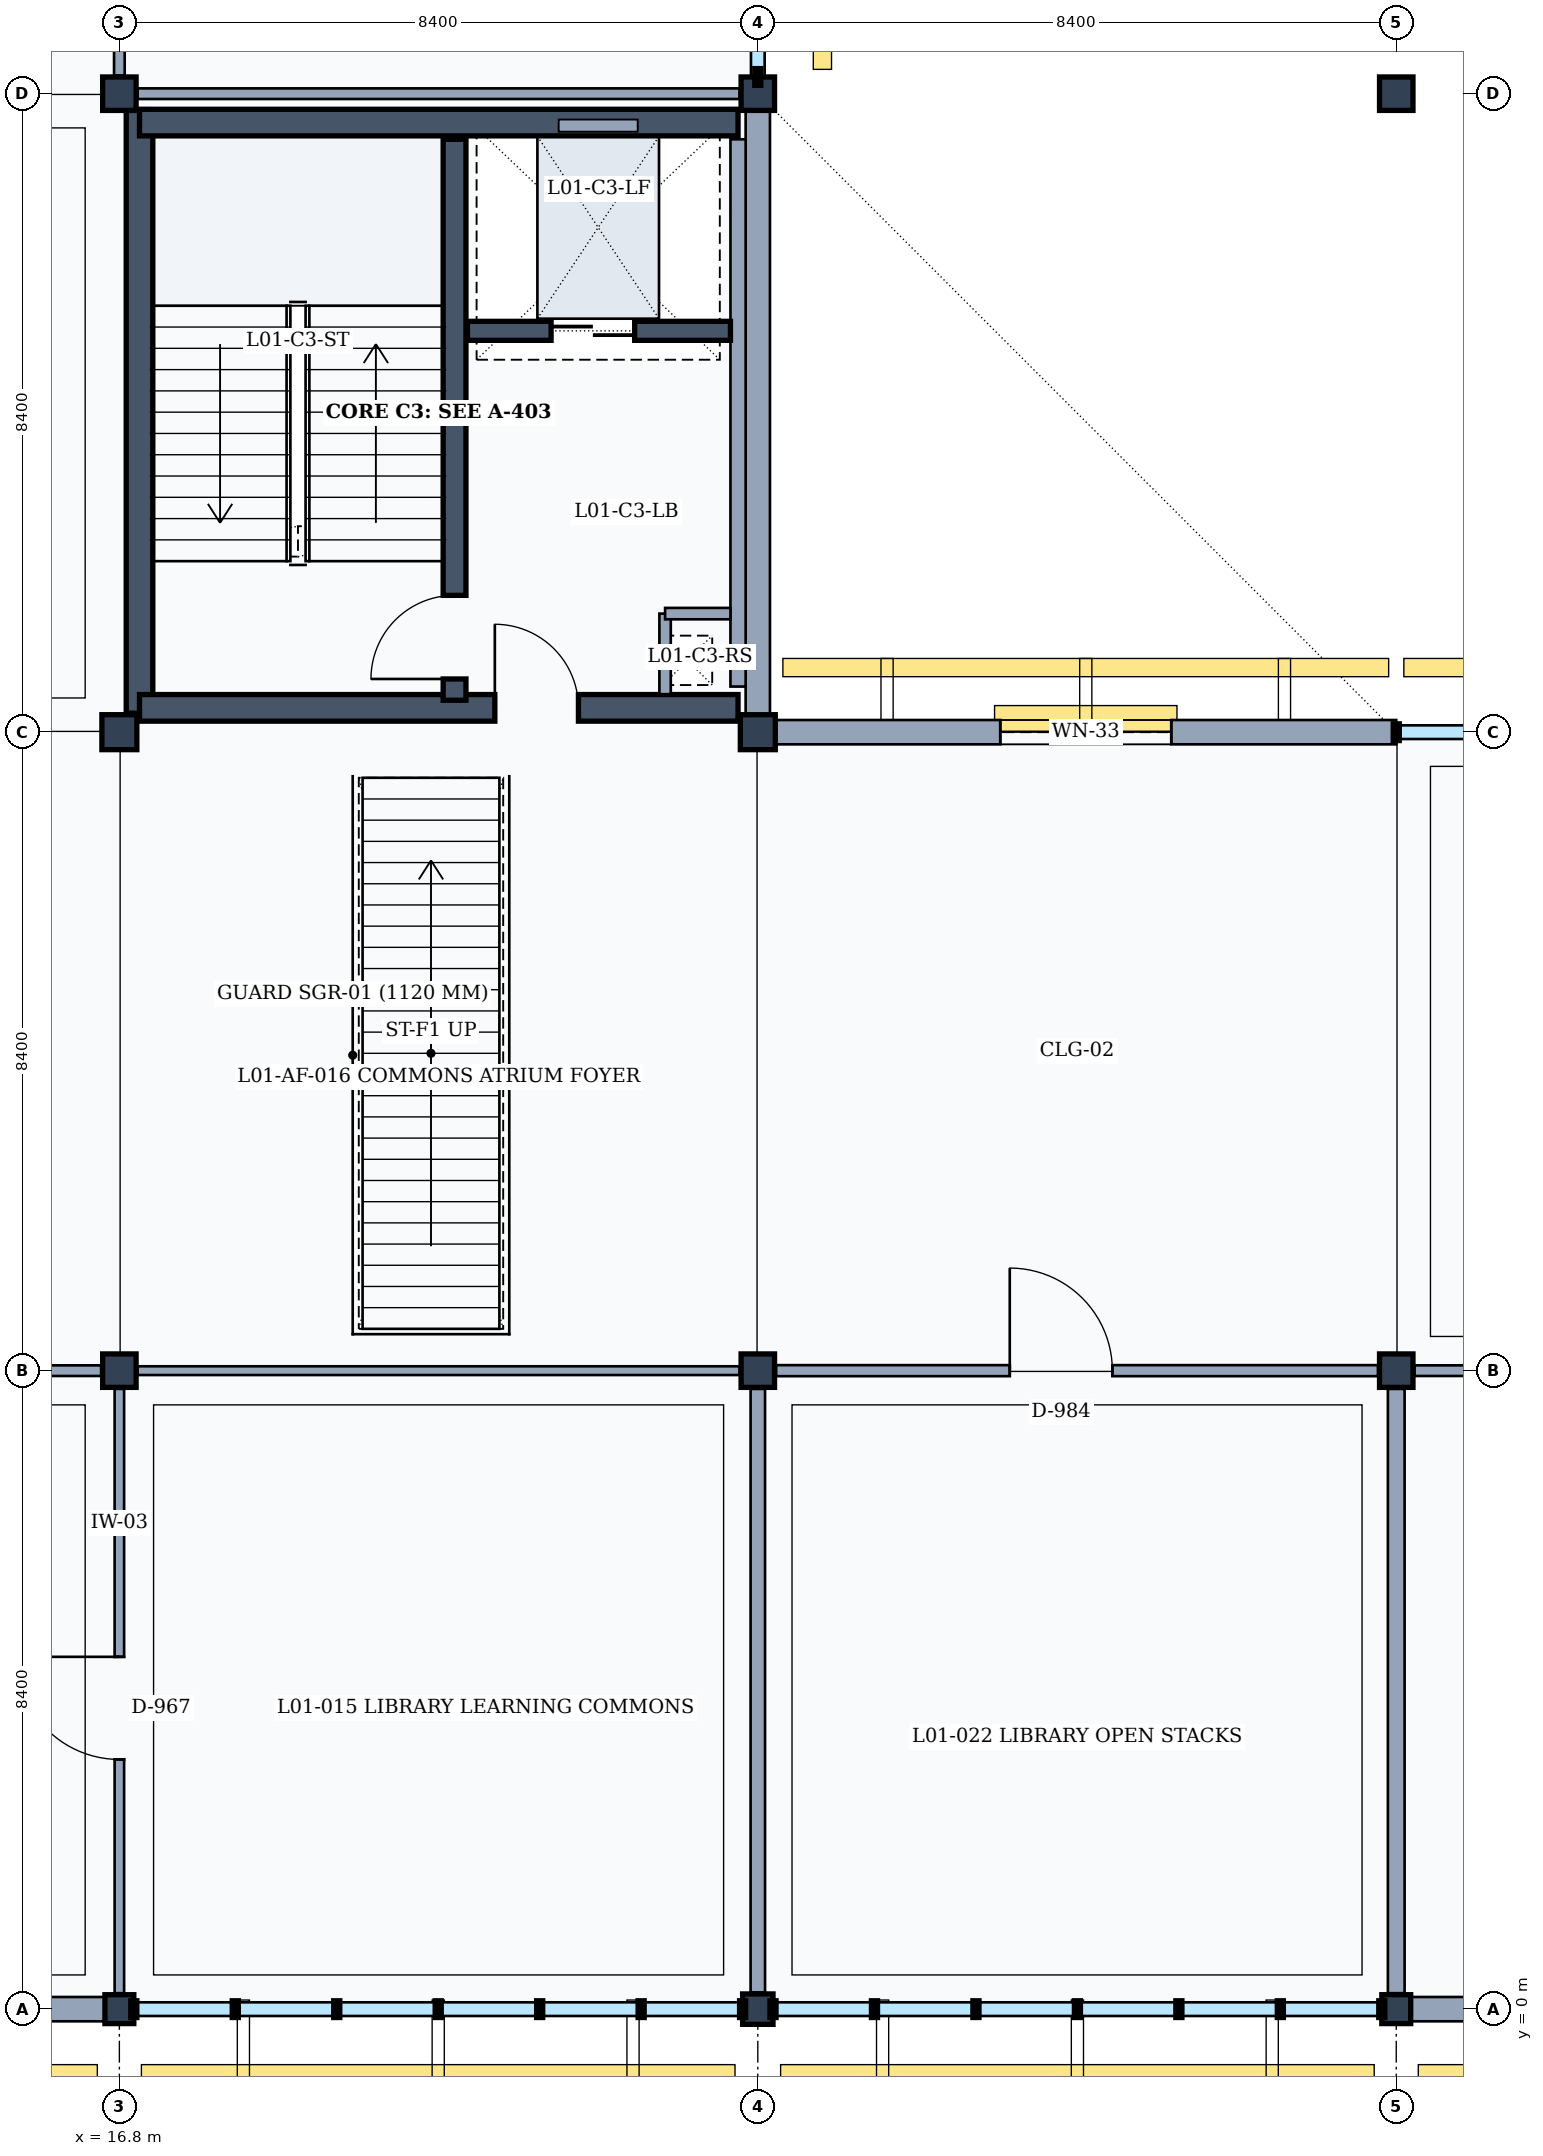
"""IFC4 building model, lengths in metres.
Left out: names, types, materials, properties, quantities, classifications, styles, units other than length and angle.
Written with IfcOpenShell. Run it as: python <this file> out.ifc"""

import sys

from ifc_helpers import new_model, si_unit, direction, frame, frame_2d, origin, origin_2d, place, context, subcontext, project, spatial, rectangle, extrude, element, fill, save


model = new_model("IFC4")
c1 = context("Model", 3, precision=1e-05, world=origin(), true_north=direction((0.0, 1.0)))
c2 = subcontext(c1, "Body", "Model", "MODEL_VIEW")
j1 = project(units=[si_unit("LENGTHUNIT", "METRE"), si_unit("PLANEANGLEUNIT", "RADIAN")], contexts=[c1])
p1 = place(None, origin())
s1 = spatial("IfcSite", under=j1, at=p1, CompositionType="ELEMENT")
p2 = place(p1, origin())
s2 = spatial("IfcBuilding", under=s1, at=p2, CompositionType="ELEMENT")
p3 = place(p2, frame((0.0, 0.0, 4.8)))
s3 = spatial("IfcBuildingStorey", under=s2, at=p3, CompositionType="ELEMENT", Elevation=4.8)
p4 = place(p3, frame((16.8, 0.0, 0.0), z_axis=(0.0, 0.0, 1.0), x_axis=(1.0, 0.0, 0.0)))
e1 = element("IfcColumn", 1, at=p4, inside=s3, PredefinedType="COLUMN", context=c2, shape_type="SweptSolid", body=[
    extrude(rectangle(XDim=0.38, YDim=0.38, at=origin_2d()), origin(), (0.0, 0.0, 1.0), 4.8),
])
p5 = place(p3, frame((16.8, 8.4, 0.0), z_axis=(0.0, 0.0, 1.0), x_axis=(1.0, 0.0, 0.0)))
e2 = element("IfcColumn", 2, at=p5, inside=s3, PredefinedType="COLUMN", context=c2, shape_type="SweptSolid", body=[
    extrude(rectangle(XDim=0.44, YDim=0.44, at=origin_2d()), origin(), (0.0, 0.0, 1.0), 4.8),
])
p6 = place(p3, frame((16.8, 16.8, 0.0), z_axis=(0.0, 0.0, 1.0), x_axis=(1.0, 0.0, 0.0)))
e3 = element("IfcColumn", 3, at=p6, inside=s3, PredefinedType="COLUMN", context=c2, shape_type="SweptSolid", body=[
    extrude(rectangle(XDim=0.46, YDim=0.46, at=origin_2d()), origin(), (0.0, 0.0, 1.0), 4.8),
])
p7 = place(p3, frame((16.8, 25.2, 0.0), z_axis=(0.0, 0.0, 1.0), x_axis=(1.0, 0.0, 0.0)))
e4 = element("IfcColumn", 4, at=p7, inside=s3, PredefinedType="COLUMN", context=c2, shape_type="SweptSolid", body=[
    extrude(rectangle(XDim=0.44, YDim=0.44, at=origin_2d()), origin(), (0.0, 0.0, 1.0), 4.8),
])
p8 = place(p3, frame((25.2, 0.0, 0.0), z_axis=(0.0, 0.0, 1.0), x_axis=(1.0, 0.0, 0.0)))
e5 = element("IfcColumn", 5, at=p8, inside=s3, PredefinedType="COLUMN", context=c2, shape_type="SweptSolid", body=[
    extrude(rectangle(XDim=0.4, YDim=0.4, at=origin_2d()), origin(), (0.0, 0.0, 1.0), 4.8),
])
p9 = place(p3, frame((25.2, 8.4, 0.0), z_axis=(0.0, 0.0, 1.0), x_axis=(1.0, 0.0, 0.0)))
e6 = element("IfcColumn", 6, at=p9, inside=s3, PredefinedType="COLUMN", context=c2, shape_type="SweptSolid", body=[
    extrude(rectangle(XDim=0.44, YDim=0.44, at=origin_2d()), origin(), (0.0, 0.0, 1.0), 4.8),
])
p10 = place(p3, frame((25.2, 16.8, 0.0), z_axis=(0.0, 0.0, 1.0), x_axis=(1.0, 0.0, 0.0)))
e7 = element("IfcColumn", 7, at=p10, inside=s3, PredefinedType="COLUMN", context=c2, shape_type="SweptSolid", body=[
    extrude(rectangle(XDim=0.46, YDim=0.46, at=origin_2d()), origin(), (0.0, 0.0, 1.0), 4.8),
])
p11 = place(p3, frame((25.2, 25.2, 0.0), z_axis=(0.0, 0.0, 1.0), x_axis=(1.0, 0.0, 0.0)))
e8 = element("IfcColumn", 8, at=p11, inside=s3, PredefinedType="COLUMN", context=c2, shape_type="SweptSolid", body=[
    extrude(rectangle(XDim=0.44, YDim=0.44, at=origin_2d()), origin(), (0.0, 0.0, 1.0), 4.8),
])
p12 = place(p3, frame((33.6, 0.0, 0.0), z_axis=(0.0, 0.0, 1.0), x_axis=(1.0, 0.0, 0.0)))
e9 = element("IfcColumn", 9, at=p12, inside=s3, PredefinedType="COLUMN", context=c2, shape_type="SweptSolid", body=[
    extrude(rectangle(XDim=0.38, YDim=0.38, at=origin_2d()), origin(), (0.0, 0.0, 1.0), 4.8),
])
for number, where, z_axis, x_axis in (
    (10, (33.6, 8.4, 0.0), (0.0, 0.0, 1.0), (1.0, 0.0, 0.0)),
    (11, (33.6, 25.2, 0.0), (0.0, 0.0, 1.0), (1.0, 0.0, 0.0)),
):
    element("IfcColumn", number, at=place(p3, frame(where, z_axis=z_axis, x_axis=x_axis)), inside=s3, PredefinedType="COLUMN", context=c2, shape_type="SweptSolid", body=[
        extrude(rectangle(XDim=0.44, YDim=0.44, at=origin_2d()), origin(), (0.0, 0.0, 1.0), 4.8),
    ])
p13 = place(p3, frame((16.61, 0.0, 0.0), z_axis=(0.0, 0.0, 1.0), x_axis=(-1.0, 0.0, 0.0)))
e12 = element("IfcWall", 12, at=p13, inside=s3, PredefinedType="SOLIDWALL", context=c2, shape_type="SweptSolid", body=[
    extrude(rectangle(XDim=8.01, YDim=0.32, at=frame_2d((4.005, 0.0))), origin(), (0.0, 0.0, 1.0), 3.96),
])
p14 = place(p13, frame((3.33, 0.0, 0.9)))
e13 = element("IfcOpeningElement", 13, at=p14, cuts=e12, PredefinedType="OPENING", context=c2, shape_type="SweptSolid", body=[
    extrude(rectangle(XDim=1.35, YDim=1.6, at=frame_2d((0.675, 0.8))), frame((0.0, 0.17, 0.0), z_axis=(0.0, -1.0, 0.0), x_axis=(1.0, 0.0, 0.0)), (0.0, 0.0, 1.0), 0.34),
])
p15 = place(p3, frame((25.2, 24.98, 0.0), z_axis=(0.0, 0.0, 1.0), x_axis=(0.0, -1.0, 0.0)))
e14 = element("IfcWall", 14, at=p15, inside=s3, PredefinedType="SOLIDWALL", context=c2, shape_type="SweptSolid", body=[
    extrude(rectangle(XDim=7.95, YDim=0.32, at=frame_2d((3.975, 0.0))), origin(), (0.0, 0.0, 1.0), 3.96),
])
p16 = place(p3, frame((25.43, 16.8, 0.0), z_axis=(0.0, 0.0, 1.0), x_axis=(1.0, 0.0, 0.0)))
e15 = element("IfcWall", 15, at=p16, inside=s3, PredefinedType="SOLIDWALL", context=c2, shape_type="SweptSolid", body=[
    extrude(rectangle(XDim=8.17, YDim=0.32, at=frame_2d((4.085, 0.0))), origin(), (0.0, 0.0, 1.0), 2.95),
])
p17 = place(p16, frame((2.96, 0.0, 0.9)))
e16 = element("IfcOpeningElement", 16, at=p17, cuts=e15, PredefinedType="OPENING", context=c2, shape_type="SweptSolid", body=[
    extrude(rectangle(XDim=2.25, YDim=1.6, at=frame_2d((1.125, 0.8))), frame((0.0, 0.17, 0.0), z_axis=(0.0, -1.0, 0.0), x_axis=(1.0, 0.0, 0.0)), (0.0, 0.0, 1.0), 0.34),
])
p18 = place(p3, frame((41.8, 0.0, 0.0), z_axis=(0.0, 0.0, 1.0), x_axis=(-1.0, 0.0, 0.0)))
e17 = element("IfcWall", 17, at=p18, inside=s3, PredefinedType="SOLIDWALL", context=c2, shape_type="SweptSolid", body=[
    extrude(rectangle(XDim=8.01, YDim=0.32, at=frame_2d((4.005, 0.0))), origin(), (0.0, 0.0, 1.0), 3.96),
])
p19 = place(p18, frame((2.68, 0.0, 0.9)))
e18 = element("IfcOpeningElement", 18, at=p19, cuts=e17, PredefinedType="OPENING", context=c2, shape_type="SweptSolid", body=[
    extrude(rectangle(XDim=2.65, YDim=1.8, at=frame_2d((1.325, 0.9))), frame((0.0, 0.17, 0.0), z_axis=(0.0, -1.0, 0.0), x_axis=(1.0, 0.0, 0.0)), (0.0, 0.0, 1.0), 0.34),
])
p20 = place(p3, frame((17.065, 17.05, 0.0), z_axis=(0.0, 0.0, 1.0), x_axis=(0.0, 1.0, 0.0)))
e19 = element("IfcWall", 19, at=p20, inside=s3, PredefinedType="SHEAR", context=c2, shape_type="SweptSolid", body=[
    extrude(rectangle(XDim=7.94, YDim=0.35, at=frame_2d((3.97, 0.0))), origin(), (0.0, 0.0, 1.0), 4.56),
])
p21 = place(p3, frame((17.065, 24.82, 0.0), z_axis=(0.0, 0.0, 1.0), x_axis=(1.0, 0.0, 0.0)))
e20 = element("IfcWall", 20, at=p21, inside=s3, PredefinedType="SHEAR", context=c2, shape_type="SweptSolid", body=[
    extrude(rectangle(XDim=7.875, YDim=0.35, at=frame_2d((3.938, 0.0))), origin(), (0.0, 0.0, 1.0), 4.56),
])
p22 = place(p3, frame((24.94, 24.6, 0.0), z_axis=(0.0, 0.0, 1.0), x_axis=(0.0, -1.0, 0.0)))
e21 = element("IfcWall", 21, at=p22, inside=s3, PredefinedType="PARTITIONING", context=c2, shape_type="SweptSolid", body=[
    extrude(rectangle(XDim=7.2, YDim=0.2, at=frame_2d((3.6, 0.0))), origin(), (0.0, 0.0, 1.0), 3.92),
])
p23 = place(p3, frame((24.94, 17.12, 0.0), z_axis=(0.0, 0.0, 1.0), x_axis=(-1.0, 0.0, 0.0)))
e22 = element("IfcWall", 22, at=p23, inside=s3, PredefinedType="SHEAR", context=c2, shape_type="SweptSolid", body=[
    extrude(rectangle(XDim=7.875, YDim=0.35, at=frame_2d((3.938, 0.0))), origin(), (0.0, 0.0, 1.0), 4.56),
])
p24 = place(p23, frame((2.1, 0.0, 0.0)))
e23 = element("IfcOpeningElement", 23, at=p24, cuts=e22, PredefinedType="OPENING", context=c2, shape_type="SweptSolid", body=[
    extrude(rectangle(XDim=1.1, YDim=2.15, at=frame_2d((0.55, 1.075))), frame((0.0, 0.185, 0.0), z_axis=(0.0, -1.0, 0.0), x_axis=(1.0, 0.0, 0.0)), (0.0, 0.0, 1.0), 0.37),
])
p25 = place(p3, frame((21.21, 17.22, 0.0), z_axis=(0.0, 0.0, 1.0), x_axis=(0.0, 1.0, 0.0)))
e24 = element("IfcWall", 24, at=p25, inside=s3, PredefinedType="SHEAR", context=c2, shape_type="SweptSolid", body=[
    extrude(rectangle(XDim=7.38, YDim=0.3, at=frame_2d((3.69, 0.0))), origin(), (0.0, 0.0, 1.0), 4.56),
])
p26 = place(p25, frame((0.28, 0.0, 0.0)))
e25 = element("IfcOpeningElement", 25, at=p26, cuts=e24, PredefinedType="OPENING", context=c2, shape_type="SweptSolid", body=[
    extrude(rectangle(XDim=1.1, YDim=2.15, at=frame_2d((0.55, 1.075))), frame((0.0, 0.16, 0.0), z_axis=(0.0, -1.0, 0.0), x_axis=(1.0, 0.0, 0.0)), (0.0, 0.0, 1.0), 0.32),
])
p27 = place(p3, frame((23.98, 18.36, 0.0), z_axis=(0.0, 0.0, 1.0), x_axis=(0.0, -1.0, 0.0)))
e26 = element("IfcWall", 26, at=p27, inside=s3, PredefinedType="PARTITIONING", context=c2, shape_type="SweptSolid", body=[
    extrude(rectangle(XDim=1.06, YDim=0.15, at=frame_2d((0.53, 0.0))), origin(), (0.0, 0.0, 1.0), 3.92),
])
p28 = place(p3, frame((23.98, 18.36, 0.0), z_axis=(0.0, 0.0, 1.0), x_axis=(1.0, 0.0, 0.0)))
e27 = element("IfcWall", 27, at=p28, inside=s3, PredefinedType="PARTITIONING", context=c2, shape_type="SweptSolid", body=[
    extrude(rectangle(XDim=0.86, YDim=0.15, at=frame_2d((0.43, 0.0))), origin(), (0.0, 0.0, 1.0), 3.92),
])
p29 = place(p3, frame((21.38, 22.08, 0.0), z_axis=(0.0, 0.0, 1.0), x_axis=(1.0, 0.0, 0.0)))
e28 = element("IfcWall", 28, at=p29, inside=s3, PredefinedType="SHEAR", context=c2, shape_type="SweptSolid", body=[
    extrude(rectangle(XDim=3.46, YDim=0.25, at=frame_2d((1.73, 0.0))), origin(), (0.0, 0.0, 1.0), 4.56),
])
p30 = place(p29, frame((1.1, 0.0, 0.0)))
e29 = element("IfcOpeningElement", 29, at=p30, cuts=e28, PredefinedType="OPENING", context=c2, shape_type="SweptSolid", body=[
    extrude(rectangle(XDim=1.1, YDim=2.15, at=frame_2d((0.55, 1.075))), frame((0.0, 0.135, 0.0), z_axis=(0.0, -1.0, 0.0), x_axis=(1.0, 0.0, 0.0)), (0.0, 0.0, 1.0), 0.27),
])
p31 = place(p3, frame((16.8, 0.21, 0.0), z_axis=(0.0, 0.0, 1.0), x_axis=(0.0, 1.0, 0.0)))
e30 = element("IfcWall", 30, at=p31, inside=s3, PredefinedType="PARTITIONING", context=c2, shape_type="SweptSolid", body=[
    extrude(rectangle(XDim=7.95, YDim=0.125, at=frame_2d((3.975, 0.0))), origin(), (0.0, 0.0, 1.0), 3.92),
])
p32 = place(p31, frame((3.075, 0.0, 0.0)))
e31 = element("IfcOpeningElement", 31, at=p32, cuts=e30, PredefinedType="OPENING", context=c2, shape_type="SweptSolid", body=[
    extrude(rectangle(XDim=1.35, YDim=2.25, at=frame_2d((0.675, 1.125))), frame((0.0, 0.073, 0.0), z_axis=(0.0, -1.0, 0.0), x_axis=(1.0, 0.0, 0.0)), (0.0, 0.0, 1.0), 0.145),
])
p33 = place(p3, frame((8.64, 8.4, 0.0), z_axis=(0.0, 0.0, 1.0), x_axis=(1.0, 0.0, 0.0)))
e32 = element("IfcWall", 32, at=p33, inside=s3, PredefinedType="PARTITIONING", context=c2, shape_type="SweptSolid", body=[
    extrude(rectangle(XDim=7.92, YDim=0.14, at=frame_2d((3.96, 0.0))), origin(), (0.0, 0.0, 1.0), 3.92),
])
p34 = place(p33, frame((3.025, 0.0, 0.0)))
e33 = element("IfcOpeningElement", 33, at=p34, cuts=e32, PredefinedType="OPENING", context=c2, shape_type="SweptSolid", body=[
    extrude(rectangle(XDim=1.45, YDim=2.35, at=frame_2d((0.725, 1.175))), frame((0.0, 0.08, 0.0), z_axis=(0.0, -1.0, 0.0), x_axis=(1.0, 0.0, 0.0)), (0.0, 0.0, 1.0), 0.16),
])
p35 = place(p3, frame((16.8, 25.44, 0.0), z_axis=(0.0, 0.0, 1.0), x_axis=(0.0, 1.0, 0.0)))
e34 = element("IfcWall", 34, at=p35, inside=s3, PredefinedType="PARTITIONING", context=c2, shape_type="SweptSolid", body=[
    extrude(rectangle(XDim=7.91, YDim=0.14, at=frame_2d((3.955, 0.0))), origin(), (0.0, 0.0, 1.0), 3.92),
])
p36 = place(p35, frame((3.275, 0.0, 0.0)))
e35 = element("IfcOpeningElement", 35, at=p36, cuts=e34, PredefinedType="OPENING", context=c2, shape_type="SweptSolid", body=[
    extrude(rectangle(XDim=0.95, YDim=2.15, at=frame_2d((0.475, 1.075))), frame((0.0, 0.08, 0.0), z_axis=(0.0, -1.0, 0.0), x_axis=(1.0, 0.0, 0.0)), (0.0, 0.0, 1.0), 0.16),
])
p37 = place(p3, frame((25.2, 0.22, 0.0), z_axis=(0.0, 0.0, 1.0), x_axis=(0.0, 1.0, 0.0)))
e36 = element("IfcWall", 36, at=p37, inside=s3, PredefinedType="PARTITIONING", context=c2, shape_type="SweptSolid", body=[
    extrude(rectangle(XDim=7.94, YDim=0.19, at=frame_2d((3.97, 0.0))), origin(), (0.0, 0.0, 1.0), 3.92),
])
p38 = place(p3, frame((17.04, 8.4, 0.0), z_axis=(0.0, 0.0, 1.0), x_axis=(1.0, 0.0, 0.0)))
e37 = element("IfcWall", 37, at=p38, inside=s3, PredefinedType="PARTITIONING", context=c2, shape_type="SweptSolid", body=[
    extrude(rectangle(XDim=7.92, YDim=0.115, at=frame_2d((3.96, 0.0))), origin(), (0.0, 0.0, 1.0), 3.92),
])
p39 = place(p3, frame((17.04, 25.2, 0.0), z_axis=(0.0, 0.0, 1.0), x_axis=(1.0, 0.0, 0.0)))
e38 = element("IfcWall", 38, at=p39, inside=s3, PredefinedType="PARTITIONING", context=c2, shape_type="SweptSolid", body=[
    extrude(rectangle(XDim=7.92, YDim=0.14, at=frame_2d((3.96, 0.0))), origin(), (0.0, 0.0, 1.0), 3.92),
])
p40 = place(p3, frame((33.6, 0.21, 0.0), z_axis=(0.0, 0.0, 1.0), x_axis=(0.0, 1.0, 0.0)))
e39 = element("IfcWall", 39, at=p40, inside=s3, PredefinedType="PARTITIONING", context=c2, shape_type="SweptSolid", body=[
    extrude(rectangle(XDim=7.95, YDim=0.22, at=frame_2d((3.975, 0.0))), origin(), (0.0, 0.0, 1.0), 3.92),
])
p41 = place(p3, frame((25.44, 8.4, 0.0), z_axis=(0.0, 0.0, 1.0), x_axis=(1.0, 0.0, 0.0)))
e40 = element("IfcWall", 40, at=p41, inside=s3, PredefinedType="PARTITIONING", context=c2, shape_type="SweptSolid", body=[
    extrude(rectangle(XDim=7.92, YDim=0.145, at=frame_2d((3.96, 0.0))), origin(), (0.0, 0.0, 1.0), 3.92),
])
p42 = place(p41, frame((3.075, 0.0, 0.0)))
e41 = element("IfcOpeningElement", 41, at=p42, cuts=e40, PredefinedType="OPENING", context=c2, shape_type="SweptSolid", body=[
    extrude(rectangle(XDim=1.35, YDim=2.25, at=frame_2d((0.675, 1.125))), frame((0.0, 0.083, 0.0), z_axis=(0.0, -1.0, 0.0), x_axis=(1.0, 0.0, 0.0)), (0.0, 0.0, 1.0), 0.165),
])
p43 = place(p3, frame((33.84, 8.4, 0.0), z_axis=(0.0, 0.0, 1.0), x_axis=(1.0, 0.0, 0.0)))
e42 = element("IfcWall", 42, at=p43, inside=s3, PredefinedType="PARTITIONING", context=c2, shape_type="SweptSolid", body=[
    extrude(rectangle(XDim=7.92, YDim=0.14, at=frame_2d((3.96, 0.0))), origin(), (0.0, 0.0, 1.0), 3.92),
])
p44 = place(p43, frame((3.225, 0.0, 0.0)))
e43 = element("IfcOpeningElement", 43, at=p44, cuts=e42, PredefinedType="OPENING", context=c2, shape_type="SweptSolid", body=[
    extrude(rectangle(XDim=1.05, YDim=2.2, at=frame_2d((0.525, 1.1))), frame((0.0, 0.08, 0.0), z_axis=(0.0, -1.0, 0.0), x_axis=(1.0, 0.0, 0.0)), (0.0, 0.0, 1.0), 0.16),
])
p45 = place(p17, origin())
e44 = element("IfcWindow", 44, at=p45, inside=s3, PartitioningType="SINGLE_PANEL", PredefinedType="WINDOW", context=c2, shape_type="SweptSolid", body=[
    extrude(rectangle(XDim=2.25, YDim=1.6, at=frame_2d((1.125, 0.8))), frame((0.0, 0.03, 0.0), z_axis=(0.0, -1.0, 0.0), x_axis=(1.0, 0.0, 0.0)), (0.0, 0.0, 1.0), 0.06),
])
fill(e16, e44)
p46 = place(p24, frame((1.1, 0.0, 0.0), z_axis=(0.0, 0.0, 1.0), x_axis=(-1.0, 0.0, 0.0)))
e45 = element("IfcDoor", 45, at=p46, inside=s3, OperationType="SINGLE_SWING_LEFT", PredefinedType="DOOR", context=c2, shape_type="SweptSolid", body=[
    extrude(rectangle(XDim=1.1, YDim=2.15, at=frame_2d((0.55, 1.075))), frame((0.0, 0.025, 0.0), z_axis=(0.0, -1.0, 0.0), x_axis=(1.0, 0.0, 0.0)), (0.0, 0.0, 1.0), 0.05),
])
fill(e23, e45)
p47 = place(p26, origin())
e46 = element("IfcDoor", 46, at=p47, inside=s3, OperationType="SINGLE_SWING_LEFT", PredefinedType="DOOR", context=c2, shape_type="SweptSolid", body=[
    extrude(rectangle(XDim=1.1, YDim=2.15, at=frame_2d((0.55, 1.075))), frame((0.0, 0.025, 0.0), z_axis=(0.0, -1.0, 0.0), x_axis=(1.0, 0.0, 0.0)), (0.0, 0.0, 1.0), 0.05),
])
fill(e25, e46)
p48 = place(p30, origin())
e47 = element("IfcDoor", 47, at=p48, inside=s3, OperationType="DOUBLE_DOOR_SLIDING", PredefinedType="DOOR", context=c2, shape_type="SweptSolid", body=[
    extrude(rectangle(XDim=1.1, YDim=2.15, at=frame_2d((0.55, 1.075))), frame((0.0, 0.025, 0.0), z_axis=(0.0, -1.0, 0.0), x_axis=(1.0, 0.0, 0.0)), (0.0, 0.0, 1.0), 0.05),
])
fill(e29, e47)
p49 = place(p32, origin())
e48 = element("IfcDoor", 48, at=p49, inside=s3, OperationType="SINGLE_SWING_RIGHT", PredefinedType="DOOR", context=c2, shape_type="SweptSolid", body=[
    extrude(rectangle(XDim=1.35, YDim=2.25, at=frame_2d((0.675, 1.125))), frame((0.0, 0.025, 0.0), z_axis=(0.0, -1.0, 0.0), x_axis=(1.0, 0.0, 0.0)), (0.0, 0.0, 1.0), 0.05),
])
fill(e31, e48)
p50 = place(p42, origin())
e49 = element("IfcDoor", 49, at=p50, inside=s3, OperationType="SINGLE_SWING_LEFT", PredefinedType="DOOR", context=c2, shape_type="SweptSolid", body=[
    extrude(rectangle(XDim=1.35, YDim=2.25, at=frame_2d((0.675, 1.125))), frame((0.0, 0.025, 0.0), z_axis=(0.0, -1.0, 0.0), x_axis=(1.0, 0.0, 0.0)), (0.0, 0.0, 1.0), 0.05),
])
fill(e41, e49)
save(model, sys.argv[1])
